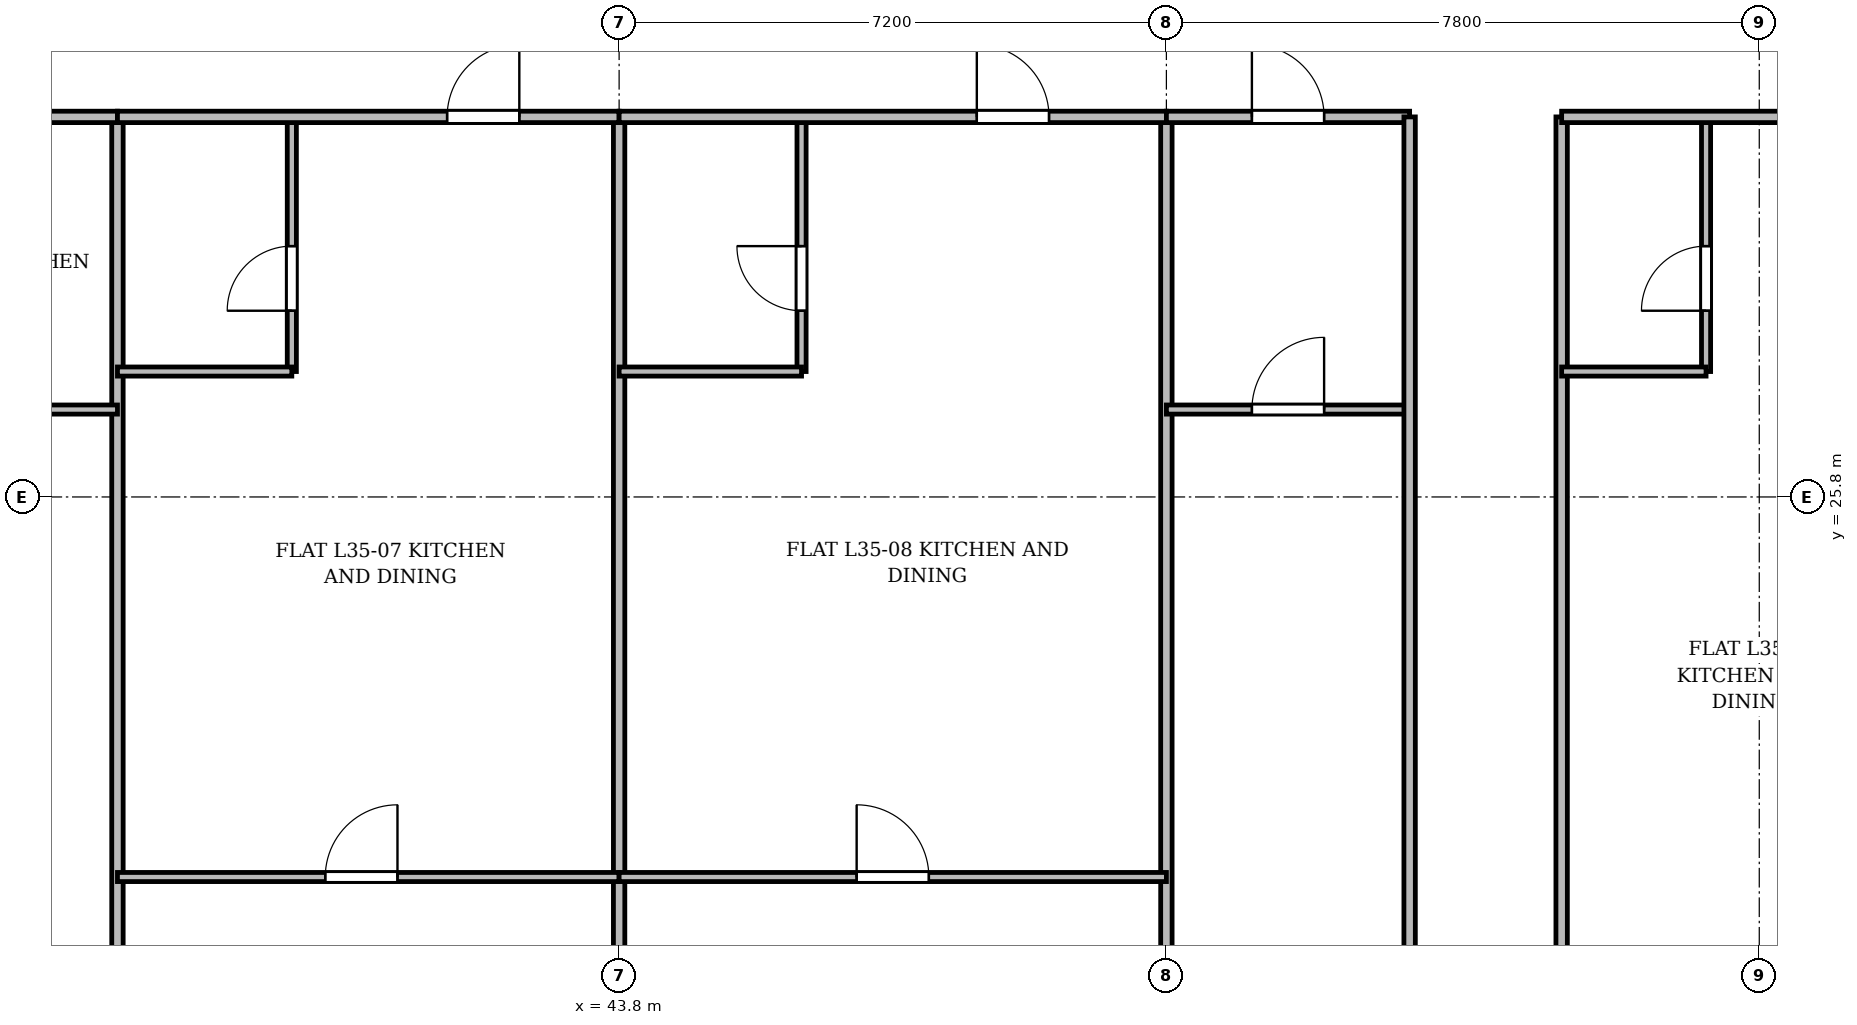
"""IFC4 building model, lengths in metres.
Left out: names, types, materials, properties, quantities, classifications, styles, units other than length and angle.
Written with IfcOpenShell. Run it as: python <this file> out.ifc"""

import sys

from ifc_helpers import new_model, si_unit, direction, frame, frame_2d, origin, place, context, subcontext, project, spatial, rectangle, extrude, source, transform, mapped, element, fill, save


model = new_model("IFC4")
c1 = context("Model", 3, precision=1e-05, world=origin(), true_north=direction((0.0, 1.0)))
c2 = subcontext(c1, "Body", "Model", "MODEL_VIEW")
j1 = project(units=[si_unit("LENGTHUNIT", "METRE"), si_unit("PLANEANGLEUNIT", "RADIAN")], contexts=[c1])
p1 = place(None, origin())
s1 = spatial("IfcSite", under=j1, at=p1, CompositionType="ELEMENT")
p2 = place(p1, origin())
s2 = spatial("IfcBuilding", under=s1, at=p2, CompositionType="ELEMENT")
p3 = place(p2, frame((0.0, 0.0, 135.7)))
s3 = spatial("IfcBuildingStorey", under=s2, at=p3, CompositionType="ELEMENT", Elevation=135.7)
p4 = place(p3, frame((37.2, 3.525, 0.0), z_axis=(0.0, 0.0, 1.0), x_axis=(0.0, 1.0, 0.0)))
e1 = element("IfcWall", 1, at=p4, inside=s3, PredefinedType="PARTITIONING", context=c2, shape_type="SweptSolid", body=[
    extrude(rectangle(XDim=27.275, YDim=0.15, at=frame_2d((13.638, 0.0))), origin(), (0.0, 0.0, 1.0), 2.75),
])
for number, where, z_axis, x_axis in (
    (2, (43.8, 3.525, 0.0), (0.0, 0.0, 1.0), (0.0, 1.0, 0.0)),
    (3, (51.0, 3.525, 0.0), (0.0, 0.0, 1.0), (0.0, 1.0, 0.0)),
):
    element("IfcWall", number, at=place(p3, frame(where, z_axis=z_axis, x_axis=x_axis)), inside=s3, PredefinedType="PARTITIONING", context=c2, shape_type="SweptSolid", body=[
        extrude(rectangle(XDim=27.275, YDim=0.15, at=frame_2d((13.638, 0.0))), origin(), (0.0, 0.0, 1.0), 2.85),
    ])
p5 = place(p3, frame((30.6, 30.8, 0.0), z_axis=(0.0, 0.0, 1.0), x_axis=(1.0, 0.0, 0.0)))
e4 = element("IfcWall", 4, at=p5, inside=s3, PredefinedType="PARTITIONING", context=c2, shape_type="SweptSolid", body=[
    extrude(rectangle(XDim=6.6, YDim=0.15, at=frame_2d((3.3, 0.0))), origin(), (0.0, 0.0, 1.0), 2.85),
])
p6 = place(p5, frame((2.734, 0.0, 0.0)))
e5 = element("IfcOpeningElement", 5, at=p6, cuts=e4, PredefinedType="OPENING", context=c2, shape_type="SweptSolid", body=[
    extrude(rectangle(XDim=0.95, YDim=2.15, at=frame_2d((0.475, 1.075))), frame((0.0, 0.085, 0.0), z_axis=(0.0, -1.0, 0.0), x_axis=(1.0, 0.0, 0.0)), (0.0, 0.0, 1.0), 0.17),
])
p7 = place(p3, frame((30.6, 26.95, 0.0), z_axis=(0.0, 0.0, 1.0), x_axis=(1.0, 0.0, 0.0)))
e6 = element("IfcWall", 6, at=p7, inside=s3, PredefinedType="PARTITIONING", context=c2, shape_type="SweptSolid", body=[
    extrude(rectangle(XDim=6.6, YDim=0.12, at=frame_2d((3.3, 0.0))), origin(), (0.0, 0.0, 1.0), 2.85),
])
p8 = place(p7, frame((2.734, 0.0, 0.0)))
e7 = element("IfcOpeningElement", 7, at=p8, cuts=e6, PredefinedType="OPENING", context=c2, shape_type="SweptSolid", body=[
    extrude(rectangle(XDim=0.95, YDim=2.15, at=frame_2d((0.475, 1.075))), frame((0.0, 0.07, 0.0), z_axis=(0.0, -1.0, 0.0), x_axis=(1.0, 0.0, 0.0)), (0.0, 0.0, 1.0), 0.14),
])
p9 = place(p3, frame((37.2, 20.8, 0.0), z_axis=(0.0, 0.0, 1.0), x_axis=(1.0, 0.0, 0.0)))
e8 = element("IfcWall", 8, at=p9, inside=s3, PredefinedType="PARTITIONING", context=c2, shape_type="SweptSolid", body=[
    extrude(rectangle(XDim=6.6, YDim=0.12, at=frame_2d((3.3, 0.0))), origin(), (0.0, 0.0, 1.0), 2.85),
])
p10 = place(p9, frame((2.734, 0.0, 0.0)))
e9 = element("IfcOpeningElement", 9, at=p10, cuts=e8, PredefinedType="OPENING", context=c2, shape_type="SweptSolid", body=[
    extrude(rectangle(XDim=0.95, YDim=2.15, at=frame_2d((0.475, 1.075))), frame((0.0, 0.07, 0.0), z_axis=(0.0, -1.0, 0.0), x_axis=(1.0, 0.0, 0.0)), (0.0, 0.0, 1.0), 0.14),
])
p11 = place(p3, frame((39.494, 27.45, 0.0), z_axis=(0.0, 0.0, 1.0), x_axis=(0.0, 1.0, 0.0)))
e10 = element("IfcWall", 10, at=p11, inside=s3, PredefinedType="PARTITIONING", context=c2, shape_type="SweptSolid", body=[
    extrude(rectangle(XDim=3.35, YDim=0.12, at=frame_2d((1.675, 0.0))), origin(), (0.0, 0.0, 1.0), 3.35),
])
p12 = place(p11, frame((0.8, 0.0, 0.0)))
e11 = element("IfcOpeningElement", 11, at=p12, cuts=e10, PredefinedType="OPENING", context=c2, shape_type="SweptSolid", body=[
    extrude(rectangle(XDim=0.85, YDim=2.1, at=frame_2d((0.425, 1.05))), frame((0.0, 0.07, 0.0), z_axis=(0.0, -1.0, 0.0), x_axis=(1.0, 0.0, 0.0)), (0.0, 0.0, 1.0), 0.14),
])
p13 = place(p3, frame((37.2, 27.45, 0.0), z_axis=(0.0, 0.0, 1.0), x_axis=(1.0, 0.0, 0.0)))
e12 = element("IfcWall", 12, at=p13, inside=s3, PredefinedType="PARTITIONING", context=c2, shape_type="SweptSolid", body=[
    extrude(rectangle(XDim=2.294, YDim=0.12, at=frame_2d((1.147, 0.0))), origin(), (0.0, 0.0, 1.0), 3.35),
])
p14 = place(p3, frame((37.2, 30.8, 0.0), z_axis=(0.0, 0.0, 1.0), x_axis=(1.0, 0.0, 0.0)))
e13 = element("IfcWall", 13, at=p14, inside=s3, PredefinedType="PARTITIONING", context=c2, shape_type="SweptSolid", body=[
    extrude(rectangle(XDim=6.6, YDim=0.15, at=frame_2d((3.3, 0.0))), origin(), (0.0, 0.0, 1.0), 2.85),
])
p15 = place(p14, frame((4.337, 0.0, 0.0)))
e14 = element("IfcOpeningElement", 14, at=p15, cuts=e13, PredefinedType="OPENING", context=c2, shape_type="SweptSolid", body=[
    extrude(rectangle(XDim=0.95, YDim=2.15, at=frame_2d((0.475, 1.075))), frame((0.0, 0.085, 0.0), z_axis=(0.0, -1.0, 0.0), x_axis=(1.0, 0.0, 0.0)), (0.0, 0.0, 1.0), 0.17),
])
p16 = place(p3, frame((43.8, 20.8, 0.0), z_axis=(0.0, 0.0, 1.0), x_axis=(1.0, 0.0, 0.0)))
e15 = element("IfcWall", 15, at=p16, inside=s3, PredefinedType="PARTITIONING", context=c2, shape_type="SweptSolid", body=[
    extrude(rectangle(XDim=7.2, YDim=0.12, at=frame_2d((3.6, 0.0))), origin(), (0.0, 0.0, 1.0), 2.85),
])
p17 = place(p16, frame((3.125, 0.0, 0.0)))
e16 = element("IfcOpeningElement", 16, at=p17, cuts=e15, PredefinedType="OPENING", context=c2, shape_type="SweptSolid", body=[
    extrude(rectangle(XDim=0.95, YDim=2.15, at=frame_2d((0.475, 1.075))), frame((0.0, 0.07, 0.0), z_axis=(0.0, -1.0, 0.0), x_axis=(1.0, 0.0, 0.0)), (0.0, 0.0, 1.0), 0.14),
])
p18 = place(p3, frame((46.2, 27.45, 0.0), z_axis=(0.0, 0.0, 1.0), x_axis=(0.0, 1.0, 0.0)))
e17 = element("IfcWall", 17, at=p18, inside=s3, PredefinedType="PARTITIONING", context=c2, shape_type="SweptSolid", body=[
    extrude(rectangle(XDim=3.35, YDim=0.12, at=frame_2d((1.675, 0.0))), origin(), (0.0, 0.0, 1.0), 3.35),
])
p19 = place(p18, frame((0.8, 0.0, 0.0)))
e18 = element("IfcOpeningElement", 18, at=p19, cuts=e17, PredefinedType="OPENING", context=c2, shape_type="SweptSolid", body=[
    extrude(rectangle(XDim=0.85, YDim=2.1, at=frame_2d((0.425, 1.05))), frame((0.0, 0.07, 0.0), z_axis=(0.0, -1.0, 0.0), x_axis=(1.0, 0.0, 0.0)), (0.0, 0.0, 1.0), 0.14),
])
p20 = place(p3, frame((43.8, 27.45, 0.0), z_axis=(0.0, 0.0, 1.0), x_axis=(1.0, 0.0, 0.0)))
e19 = element("IfcWall", 19, at=p20, inside=s3, PredefinedType="PARTITIONING", context=c2, shape_type="SweptSolid", body=[
    extrude(rectangle(XDim=2.4, YDim=0.12, at=frame_2d((1.2, 0.0))), origin(), (0.0, 0.0, 1.0), 2.85),
])
p21 = place(p3, frame((43.8, 30.8, 0.0), z_axis=(0.0, 0.0, 1.0), x_axis=(1.0, 0.0, 0.0)))
e20 = element("IfcWall", 20, at=p21, inside=s3, PredefinedType="PARTITIONING", context=c2, shape_type="SweptSolid", body=[
    extrude(rectangle(XDim=7.2, YDim=0.15, at=frame_2d((3.6, 0.0))), origin(), (0.0, 0.0, 1.0), 2.85),
])
p22 = place(p21, frame((4.706, 0.0, 0.0)))
e21 = element("IfcOpeningElement", 21, at=p22, cuts=e20, PredefinedType="OPENING", context=c2, shape_type="SweptSolid", body=[
    extrude(rectangle(XDim=0.95, YDim=2.15, at=frame_2d((0.475, 1.075))), frame((0.0, 0.085, 0.0), z_axis=(0.0, -1.0, 0.0), x_axis=(1.0, 0.0, 0.0)), (0.0, 0.0, 1.0), 0.17),
])
p23 = place(p3, frame((51.0, 30.8, 0.0), z_axis=(0.0, 0.0, 1.0), x_axis=(1.0, 0.0, 0.0)))
e22 = element("IfcWall", 22, at=p23, inside=s3, PredefinedType="PARTITIONING", context=c2, shape_type="SweptSolid", body=[
    extrude(rectangle(XDim=3.2, YDim=0.15, at=frame_2d((1.6, 0.0))), origin(), (0.0, 0.0, 1.0), 2.85),
])
p24 = place(p23, frame((1.125, 0.0, 0.0)))
e23 = element("IfcOpeningElement", 23, at=p24, cuts=e22, PredefinedType="OPENING", context=c2, shape_type="SweptSolid", body=[
    extrude(rectangle(XDim=0.95, YDim=2.15, at=frame_2d((0.475, 1.075))), frame((0.0, 0.085, 0.0), z_axis=(0.0, -1.0, 0.0), x_axis=(1.0, 0.0, 0.0)), (0.0, 0.0, 1.0), 0.17),
])
p25 = place(p3, frame((51.0, 26.95, 0.0), z_axis=(0.0, 0.0, 1.0), x_axis=(1.0, 0.0, 0.0)))
e24 = element("IfcWall", 24, at=p25, inside=s3, PredefinedType="PARTITIONING", context=c2, shape_type="SweptSolid", body=[
    extrude(rectangle(XDim=3.2, YDim=0.12, at=frame_2d((1.6, 0.0))), origin(), (0.0, 0.0, 1.0), 2.85),
])
p26 = place(p25, frame((1.125, 0.0, 0.0)))
e25 = element("IfcOpeningElement", 25, at=p26, cuts=e24, PredefinedType="OPENING", context=c2, shape_type="SweptSolid", body=[
    extrude(rectangle(XDim=0.95, YDim=2.15, at=frame_2d((0.475, 1.075))), frame((0.0, 0.07, 0.0), z_axis=(0.0, -1.0, 0.0), x_axis=(1.0, 0.0, 0.0)), (0.0, 0.0, 1.0), 0.14),
])
for number, where, z_axis, x_axis in (
    (26, (54.2, 3.525, 0.0), (0.0, 0.0, 1.0), (0.0, 1.0, 0.0)),
    (27, (56.2, 3.525, 0.0), (0.0, 0.0, 1.0), (0.0, 1.0, 0.0)),
):
    element("IfcWall", number, at=place(p3, frame(where, z_axis=z_axis, x_axis=x_axis)), inside=s3, PredefinedType="PARTITIONING", context=c2, shape_type="SweptSolid", body=[
        extrude(rectangle(XDim=27.275, YDim=0.15, at=frame_2d((13.638, 0.0))), origin(), (0.0, 0.0, 1.0), 2.75),
    ])
p27 = place(p3, frame((58.1, 27.45, 0.0), z_axis=(0.0, 0.0, 1.0), x_axis=(0.0, 1.0, 0.0)))
e28 = element("IfcWall", 28, at=p27, inside=s3, PredefinedType="PARTITIONING", context=c2, shape_type="SweptSolid", body=[
    extrude(rectangle(XDim=3.35, YDim=0.12, at=frame_2d((1.675, 0.0))), origin(), (0.0, 0.0, 1.0), 3.35),
])
p28 = place(p27, frame((0.8, 0.0, 0.0)))
e29 = element("IfcOpeningElement", 29, at=p28, cuts=e28, PredefinedType="OPENING", context=c2, shape_type="SweptSolid", body=[
    extrude(rectangle(XDim=0.85, YDim=2.1, at=frame_2d((0.425, 1.05))), frame((0.0, 0.07, 0.0), z_axis=(0.0, -1.0, 0.0), x_axis=(1.0, 0.0, 0.0)), (0.0, 0.0, 1.0), 0.14),
])
p29 = place(p3, frame((56.2, 27.45, 0.0), z_axis=(0.0, 0.0, 1.0), x_axis=(1.0, 0.0, 0.0)))
e30 = element("IfcWall", 30, at=p29, inside=s3, PredefinedType="PARTITIONING", context=c2, shape_type="SweptSolid", body=[
    extrude(rectangle(XDim=1.9, YDim=0.12, at=frame_2d((0.95, 0.0))), origin(), (0.0, 0.0, 1.0), 3.35),
])
p30 = place(p3, frame((56.2, 30.8, 0.0), z_axis=(0.0, 0.0, 1.0), x_axis=(1.0, 0.0, 0.0)))
e31 = element("IfcWall", 31, at=p30, inside=s3, PredefinedType="PARTITIONING", context=c2, shape_type="SweptSolid", body=[
    extrude(rectangle(XDim=5.0, YDim=0.15, at=frame_2d((2.5, 0.0))), origin(), (0.0, 0.0, 1.0), 2.85),
])
p31 = place(p30, frame((3.144, 0.0, 0.0)))
e32 = element("IfcOpeningElement", 32, at=p31, cuts=e31, PredefinedType="OPENING", context=c2, shape_type="SweptSolid", body=[
    extrude(rectangle(XDim=0.95, YDim=2.15, at=frame_2d((0.475, 1.075))), frame((0.0, 0.085, 0.0), z_axis=(0.0, -1.0, 0.0), x_axis=(1.0, 0.0, 0.0)), (0.0, 0.0, 1.0), 0.17),
])
m1 = source(origin(), c2, "Body", "SweptSolid", [
    extrude(rectangle(XDim=0.95, YDim=2.15, at=frame_2d((0.475, 1.075))), frame((0.0, 0.025, 0.0), z_axis=(0.0, -1.0, 0.0), x_axis=(1.0, 0.0, 0.0)), (0.0, 0.0, 1.0), 0.05),
])
p32 = place(p10, origin())
e33 = element("IfcDoor", 33, at=p32, inside=s3, OperationType="SINGLE_SWING_RIGHT", PredefinedType="DOOR", context=c2, shape_type="MappedRepresentation", body=[
    mapped(m1, transform((0.0, 0.0, 0.0), x_axis=(1.0, 0.0, 0.0), y_axis=(0.0, 1.0, 0.0), z_axis=(0.0, 0.0, 1.0), scale=1.0)),
])
fill(e9, e33)
m2 = source(origin(), c2, "Body", "SweptSolid", [
    extrude(rectangle(XDim=0.85, YDim=2.1, at=frame_2d((0.425, 1.05))), frame((0.0, 0.025, 0.0), z_axis=(0.0, -1.0, 0.0), x_axis=(1.0, 0.0, 0.0)), (0.0, 0.0, 1.0), 0.05),
])
p33 = place(p12, origin())
e34 = element("IfcDoor", 34, at=p33, inside=s3, OperationType="SINGLE_SWING_LEFT", PredefinedType="DOOR", context=c2, shape_type="MappedRepresentation", body=[
    mapped(m2, transform((0.0, 0.0, 0.0), x_axis=(1.0, 0.0, 0.0), y_axis=(0.0, 1.0, 0.0), z_axis=(0.0, 0.0, 1.0), scale=1.0)),
])
fill(e11, e34)
p34 = place(p15, origin())
e35 = element("IfcDoor", 35, at=p34, inside=s3, OperationType="SINGLE_SWING_RIGHT", PredefinedType="DOOR", context=c2, shape_type="MappedRepresentation", body=[
    mapped(m1, transform((0.0, 0.0, 0.0), x_axis=(1.0, 0.0, 0.0), y_axis=(0.0, 1.0, 0.0), z_axis=(0.0, 0.0, 1.0), scale=1.0)),
])
fill(e14, e35)
p35 = place(p17, origin())
e36 = element("IfcDoor", 36, at=p35, inside=s3, OperationType="SINGLE_SWING_LEFT", PredefinedType="DOOR", context=c2, shape_type="MappedRepresentation", body=[
    mapped(m1, transform((0.0, 0.0, 0.0), x_axis=(1.0, 0.0, 0.0), y_axis=(0.0, 1.0, 0.0), z_axis=(0.0, 0.0, 1.0), scale=1.0)),
])
fill(e16, e36)
p36 = place(p19, origin())
e37 = element("IfcDoor", 37, at=p36, inside=s3, OperationType="SINGLE_SWING_RIGHT", PredefinedType="DOOR", context=c2, shape_type="MappedRepresentation", body=[
    mapped(m2, transform((0.0, 0.0, 0.0), x_axis=(1.0, 0.0, 0.0), y_axis=(0.0, 1.0, 0.0), z_axis=(0.0, 0.0, 1.0), scale=1.0)),
])
fill(e18, e37)
p37 = place(p22, origin())
e38 = element("IfcDoor", 38, at=p37, inside=s3, OperationType="SINGLE_SWING_LEFT", PredefinedType="DOOR", context=c2, shape_type="MappedRepresentation", body=[
    mapped(m1, transform((0.0, 0.0, 0.0), x_axis=(1.0, 0.0, 0.0), y_axis=(0.0, 1.0, 0.0), z_axis=(0.0, 0.0, 1.0), scale=1.0)),
])
fill(e21, e38)
p38 = place(p24, origin())
e39 = element("IfcDoor", 39, at=p38, inside=s3, OperationType="SINGLE_SWING_LEFT", PredefinedType="DOOR", context=c2, shape_type="MappedRepresentation", body=[
    mapped(m1, transform((0.0, 0.0, 0.0), x_axis=(1.0, 0.0, 0.0), y_axis=(0.0, 1.0, 0.0), z_axis=(0.0, 0.0, 1.0), scale=1.0)),
])
fill(e23, e39)
p39 = place(p26, origin())
e40 = element("IfcDoor", 40, at=p39, inside=s3, OperationType="SINGLE_SWING_RIGHT", PredefinedType="DOOR", context=c2, shape_type="MappedRepresentation", body=[
    mapped(m1, transform((0.0, 0.0, 0.0), x_axis=(1.0, 0.0, 0.0), y_axis=(0.0, 1.0, 0.0), z_axis=(0.0, 0.0, 1.0), scale=1.0)),
])
fill(e25, e40)
p40 = place(p28, origin())
e41 = element("IfcDoor", 41, at=p40, inside=s3, OperationType="SINGLE_SWING_LEFT", PredefinedType="DOOR", context=c2, shape_type="MappedRepresentation", body=[
    mapped(m2, transform((0.0, 0.0, 0.0), x_axis=(1.0, 0.0, 0.0), y_axis=(0.0, 1.0, 0.0), z_axis=(0.0, 0.0, 1.0), scale=1.0)),
])
fill(e29, e41)
save(model, sys.argv[1])
